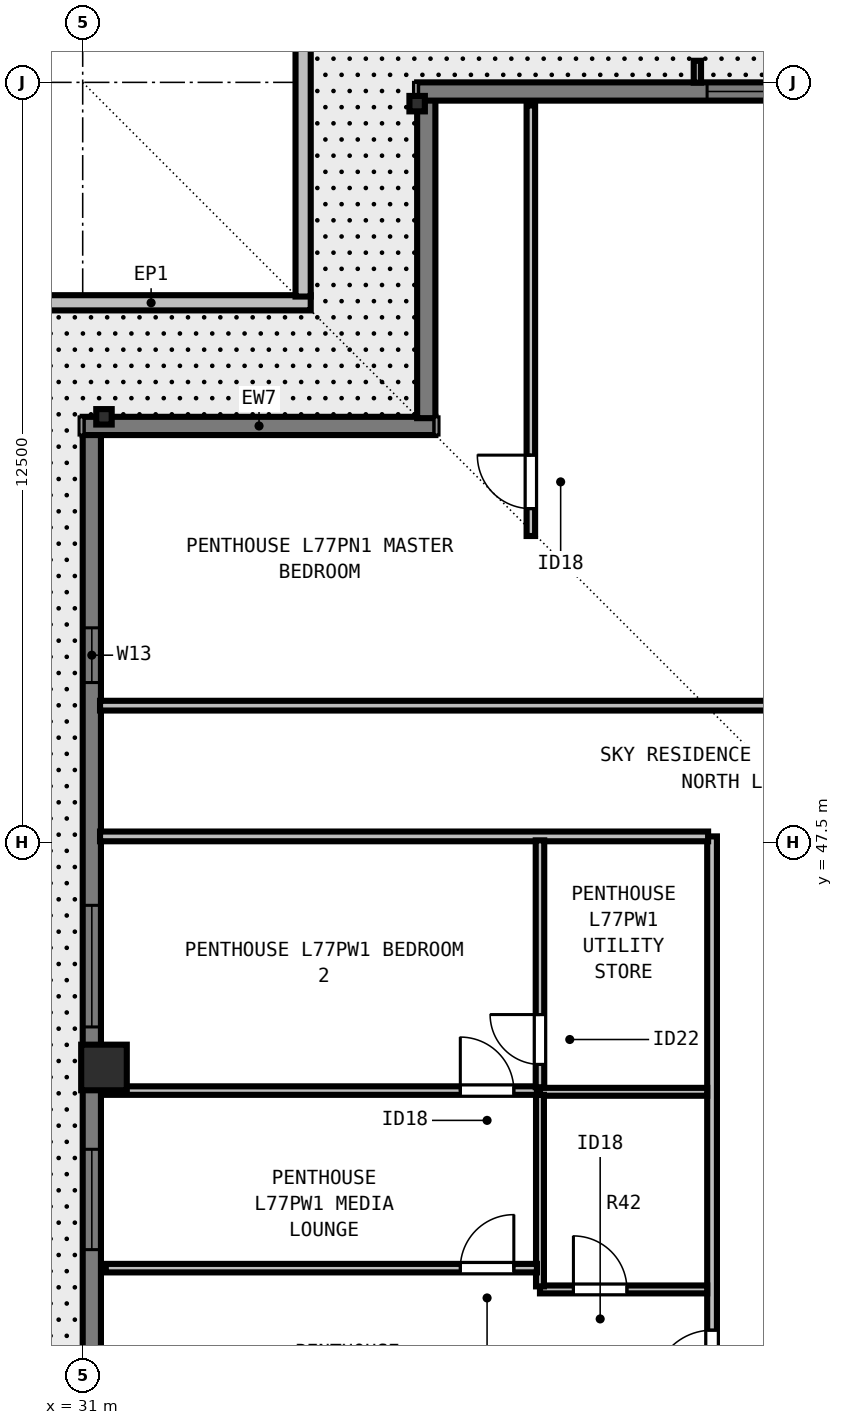
"""IFC4 building model, lengths in metres.
Left out: names, types, materials, properties, quantities, classifications, styles, units other than length and angle.
Written with IfcOpenShell. Run it as: python <this file> out.ifc"""

import sys

from ifc_helpers import new_model, si_unit, direction, frame, frame_2d, origin, origin_2d, place, context, subcontext, project, spatial, rectangle, i_section, extrude, element, fill, save


model = new_model("IFC4")
c1 = context("Model", 3, precision=1e-05, world=origin(), true_north=direction((0.0, 1.0)))
c2 = subcontext(c1, "Body", "Model", "MODEL_VIEW")
j1 = project(units=[si_unit("LENGTHUNIT", "METRE"), si_unit("PLANEANGLEUNIT", "RADIAN")], contexts=[c1])
p1 = place(None, origin())
s1 = spatial("IfcSite", under=j1, at=p1, CompositionType="ELEMENT")
p2 = place(p1, origin())
s2 = spatial("IfcBuilding", under=s1, at=p2, CompositionType="ELEMENT")
p3 = place(p2, frame((0.0, 0.0, 280.5)))
s3 = spatial("IfcBuildingStorey", under=s2, at=p3, CompositionType="ELEMENT", Elevation=280.5)
for number, where, z_axis, x_axis in (
    (1, (36.5, 59.65, 0.0), (0.0, 0.0, 1.0), (1.0, 0.0, 0.0)),
    (2, (31.35, 54.5, 0.0), (0.0, 0.0, 1.0), (0.0, 1.0, 0.0)),
):
    element("IfcColumn", number, at=place(p3, frame(where, z_axis=z_axis, x_axis=x_axis)), inside=s3, PredefinedType="COLUMN", context=c2, shape_type="SweptSolid", body=[
        extrude(i_section(OverallWidth=0.254, OverallDepth=0.254, WebThickness=0.009, FlangeThickness=0.014, FilletRadius=0.013, at=origin_2d()), origin(), (0.0, 0.0, 1.0), 3.5),
    ])
p4 = place(p3, frame((31.35, 43.8, 0.0), z_axis=(0.0, 0.0, 1.0), x_axis=(0.0, 1.0, 0.0)))
e3 = element("IfcColumn", 3, at=p4, inside=s3, PredefinedType="COLUMN", context=c2, shape_type="SweptSolid", body=[
    extrude(rectangle(XDim=0.75, YDim=0.75, at=origin_2d()), origin(), (0.0, 0.0, 1.0), 3.5),
])
p5 = place(p3, frame((29.5, 56.375, 0.0), z_axis=(0.0, 0.0, 1.0), x_axis=(1.0, 0.0, 0.0)))
e4 = element("IfcWall", 4, at=p5, inside=s3, PredefinedType="PARAPET", context=c2, shape_type="SweptSolid", body=[
    extrude(rectangle(XDim=5.25, YDim=0.25, at=frame_2d((2.625, 0.0))), origin(), (0.0, 0.0, 1.0), 1.15),
])
p6 = place(p3, frame((34.625, 56.478, 0.0), z_axis=(0.0, 0.0, 1.0), x_axis=(0.0, 1.0, 0.0)))
e5 = element("IfcWall", 5, at=p6, inside=s3, PredefinedType="PARAPET", context=c2, shape_type="SweptSolid", body=[
    extrude(rectangle(XDim=4.794, YDim=0.25, at=frame_2d((2.397, 0.0))), origin(), (0.0, 0.0, 1.0), 1.15),
])
p7 = place(p3, frame((31.15, 23.5, 0.0), z_axis=(0.0, 0.0, 1.0), x_axis=(0.0, 1.0, 0.0)))
e6 = element("IfcWall", 6, at=p7, inside=s3, PredefinedType="SOLIDWALL", context=c2, shape_type="SweptSolid", body=[
    extrude(rectangle(XDim=30.722, YDim=0.3, at=frame_2d((15.361, 0.0))), origin(), (0.0, 0.0, 1.0), 3.29),
])
p8 = place(p7, frame((8.331, 0.0, 0.8)))
e7 = element("IfcOpeningElement", 7, at=p8, cuts=e6, PredefinedType="OPENING", context=c2, shape_type="SweptSolid", body=[
    extrude(rectangle(XDim=1.65, YDim=1.758, at=frame_2d((0.825, 0.879))), frame((0.0, 0.16, 0.0), z_axis=(0.0, -1.0, 0.0), x_axis=(1.0, 0.0, 0.0)), (0.0, 0.0, 1.0), 0.32),
])
p9 = place(p7, frame((12.442, 0.0, 0.8)))
e8 = element("IfcOpeningElement", 8, at=p9, cuts=e6, PredefinedType="OPENING", context=c2, shape_type="SweptSolid", body=[
    extrude(rectangle(XDim=2.0, YDim=1.758, at=frame_2d((1.0, 0.879))), frame((0.0, 0.16, 0.0), z_axis=(0.0, -1.0, 0.0), x_axis=(1.0, 0.0, 0.0)), (0.0, 0.0, 1.0), 0.32),
])
p10 = place(p7, frame((17.304, 0.0, 0.8)))
e9 = element("IfcOpeningElement", 9, at=p10, cuts=e6, PredefinedType="OPENING", context=c2, shape_type="SweptSolid", body=[
    extrude(rectangle(XDim=1.65, YDim=1.758, at=frame_2d((0.825, 0.879))), frame((0.0, 0.16, 0.0), z_axis=(0.0, -1.0, 0.0), x_axis=(1.0, 0.0, 0.0)), (0.0, 0.0, 1.0), 0.32),
])
p11 = place(p7, frame((20.967, 0.0, 0.8)))
e10 = element("IfcOpeningElement", 10, at=p11, cuts=e6, PredefinedType="OPENING", context=c2, shape_type="SweptSolid", body=[
    extrude(rectangle(XDim=2.0, YDim=1.758, at=frame_2d((1.0, 0.879))), frame((0.0, 0.16, 0.0), z_axis=(0.0, -1.0, 0.0), x_axis=(1.0, 0.0, 0.0)), (0.0, 0.0, 1.0), 0.32),
])
p12 = place(p7, frame((26.63, 0.0, 0.8)))
e11 = element("IfcOpeningElement", 11, at=p12, cuts=e6, PredefinedType="OPENING", context=c2, shape_type="SweptSolid", body=[
    extrude(rectangle(XDim=0.9, YDim=1.75, at=frame_2d((0.45, 0.875))), frame((0.0, 0.16, 0.0), z_axis=(0.0, -1.0, 0.0), x_axis=(1.0, 0.0, 0.0)), (0.0, 0.0, 1.0), 0.32),
])
p13 = place(p3, frame((31.0, 54.35, 0.0), z_axis=(0.0, 0.0, 1.0), x_axis=(1.0, 0.0, 0.0)))
e12 = element("IfcWall", 12, at=p13, inside=s3, PredefinedType="SOLIDWALL", context=c2, shape_type="SweptSolid", body=[
    extrude(rectangle(XDim=5.8, YDim=0.3, at=frame_2d((2.9, 0.0))), origin(), (0.0, 0.0, 1.0), 3.29),
])
p14 = place(p3, frame((36.65, 54.478, 0.0), z_axis=(0.0, 0.0, 1.0), x_axis=(0.0, 1.0, 0.0)))
e13 = element("IfcWall", 13, at=p14, inside=s3, PredefinedType="SOLIDWALL", context=c2, shape_type="SweptSolid", body=[
    extrude(rectangle(XDim=5.244, YDim=0.3, at=frame_2d((2.622, 0.0))), origin(), (0.0, 0.0, 1.0), 3.29),
])
p15 = place(p3, frame((36.5, 59.85, 0.0), z_axis=(0.0, 0.0, 1.0), x_axis=(1.0, 0.0, 0.0)))
e14 = element("IfcWall", 14, at=p15, inside=s3, PredefinedType="SOLIDWALL", context=c2, shape_type="SweptSolid", body=[
    extrude(rectangle(XDim=30.722, YDim=0.3, at=frame_2d((15.361, 0.0))), origin(), (0.0, 0.0, 1.0), 3.29),
])
p16 = place(p15, frame((4.769, 0.0, 0.8)))
e15 = element("IfcOpeningElement", 15, at=p16, cuts=e14, PredefinedType="OPENING", context=c2, shape_type="SweptSolid", body=[
    extrude(rectangle(XDim=2.0, YDim=1.758, at=frame_2d((1.0, 0.879))), frame((0.0, 0.16, 0.0), z_axis=(0.0, -1.0, 0.0), x_axis=(1.0, 0.0, 0.0)), (0.0, 0.0, 1.0), 0.32),
])
p17 = place(p15, frame((8.331, 0.0, 0.8)))
e16 = element("IfcOpeningElement", 16, at=p17, cuts=e14, PredefinedType="OPENING", context=c2, shape_type="SweptSolid", body=[
    extrude(rectangle(XDim=1.65, YDim=1.758, at=frame_2d((0.825, 0.879))), frame((0.0, 0.16, 0.0), z_axis=(0.0, -1.0, 0.0), x_axis=(1.0, 0.0, 0.0)), (0.0, 0.0, 1.0), 0.32),
])
p18 = place(p15, frame((12.442, 0.0, 0.8)))
e17 = element("IfcOpeningElement", 17, at=p18, cuts=e14, PredefinedType="OPENING", context=c2, shape_type="SweptSolid", body=[
    extrude(rectangle(XDim=2.0, YDim=1.758, at=frame_2d((1.0, 0.879))), frame((0.0, 0.16, 0.0), z_axis=(0.0, -1.0, 0.0), x_axis=(1.0, 0.0, 0.0)), (0.0, 0.0, 1.0), 0.32),
])
p19 = place(p15, frame((17.304, 0.0, 0.8)))
e18 = element("IfcOpeningElement", 18, at=p19, cuts=e14, PredefinedType="OPENING", context=c2, shape_type="SweptSolid", body=[
    extrude(rectangle(XDim=1.65, YDim=1.758, at=frame_2d((0.825, 0.879))), frame((0.0, 0.16, 0.0), z_axis=(0.0, -1.0, 0.0), x_axis=(1.0, 0.0, 0.0)), (0.0, 0.0, 1.0), 0.32),
])
p20 = place(p15, frame((24.128, 0.0, 0.8)))
e19 = element("IfcOpeningElement", 19, at=p20, cuts=e14, PredefinedType="OPENING", context=c2, shape_type="SweptSolid", body=[
    extrude(rectangle(XDim=1.65, YDim=1.758, at=frame_2d((0.825, 0.879))), frame((0.0, 0.16, 0.0), z_axis=(0.0, -1.0, 0.0), x_axis=(1.0, 0.0, 0.0)), (0.0, 0.0, 1.0), 0.32),
])
p21 = place(p3, frame((31.285, 49.75, 0.0), z_axis=(0.0, 0.0, 1.0), x_axis=(1.0, 0.0, 0.0)))
e20 = element("IfcWall", 20, at=p21, inside=s3, PredefinedType="PARTITIONING", context=c2, shape_type="SweptSolid", body=[
    extrude(rectangle(XDim=41.43, YDim=0.16, at=frame_2d((20.715, 0.0))), origin(), (0.0, 0.0, 1.0), 3.009),
])
p22 = place(p21, frame((20.235, 0.0, 0.0)))
e21 = element("IfcOpeningElement", 21, at=p22, cuts=e20, PredefinedType="OPENING", context=c2, shape_type="SweptSolid", body=[
    extrude(rectangle(XDim=0.96, YDim=2.18, at=frame_2d((0.48, 1.09))), frame((0.0, 0.09, 0.0), z_axis=(0.0, -1.0, 0.0), x_axis=(1.0, 0.0, 0.0)), (0.0, 0.0, 1.0), 0.18),
])
p23 = place(p3, frame((41.35, 30.4, 0.0), z_axis=(0.0, 0.0, 1.0), x_axis=(0.0, 1.0, 0.0)))
e22 = element("IfcWall", 22, at=p23, inside=s3, PredefinedType="PARTITIONING", context=c2, shape_type="SweptSolid", body=[
    extrude(rectangle(XDim=17.2, YDim=0.16, at=frame_2d((8.6, 0.0))), origin(), (0.0, 0.0, 1.0), 3.009),
])
p24 = place(p23, frame((8.12, 0.0, 0.0)))
e23 = element("IfcOpeningElement", 23, at=p24, cuts=e22, PredefinedType="OPENING", context=c2, shape_type="SweptSolid", body=[
    extrude(rectangle(XDim=0.96, YDim=2.18, at=frame_2d((0.48, 1.09))), frame((0.0, 0.09, 0.0), z_axis=(0.0, -1.0, 0.0), x_axis=(1.0, 0.0, 0.0)), (0.0, 0.0, 1.0), 0.18),
])
p25 = place(p3, frame((31.285, 47.6, 0.0), z_axis=(0.0, 0.0, 1.0), x_axis=(1.0, 0.0, 0.0)))
e24 = element("IfcWall", 24, at=p25, inside=s3, PredefinedType="PARTITIONING", context=c2, shape_type="SweptSolid", body=[
    extrude(rectangle(XDim=10.0, YDim=0.16, at=frame_2d((5.0, 0.0))), origin(), (0.0, 0.0, 1.0), 3.29),
])
p26 = place(p3, frame((38.37, 52.54, 0.0), z_axis=(0.0, 0.0, 1.0), x_axis=(0.0, 1.0, 0.0)))
e25 = element("IfcWall", 25, at=p26, inside=s3, PredefinedType="PARTITIONING", context=c2, shape_type="SweptSolid", body=[
    extrude(rectangle(XDim=7.08, YDim=0.14, at=frame_2d((3.54, 0.0))), origin(), (0.0, 0.0, 1.0), 2.653),
])
p27 = place(p26, frame((0.45, 0.0, 0.0)))
e26 = element("IfcOpeningElement", 26, at=p27, cuts=e25, PredefinedType="OPENING", context=c2, shape_type="SweptSolid", body=[
    extrude(rectangle(XDim=0.88, YDim=2.1, at=frame_2d((0.44, 1.05))), frame((0.0, 0.08, 0.0), z_axis=(0.0, -1.0, 0.0), x_axis=(1.0, 0.0, 0.0)), (0.0, 0.0, 1.0), 0.16),
])
p28 = place(p3, frame((38.52, 43.4, 0.0), z_axis=(0.0, 0.0, 1.0), x_axis=(1.0, 0.0, 0.0)))
e27 = element("IfcWall", 27, at=p28, inside=s3, PredefinedType="PLUMBINGWALL", context=c2, shape_type="SweptSolid", body=[
    extrude(rectangle(XDim=2.75, YDim=0.13, at=frame_2d((1.375, 0.0))), origin(), (0.0, 0.0, 1.0), 3.29),
])
p29 = place(p3, frame((38.52, 40.15, 0.0), z_axis=(0.0, 0.0, 1.0), x_axis=(1.0, 0.0, 0.0)))
e28 = element("IfcWall", 28, at=p29, inside=s3, PredefinedType="PLUMBINGWALL", context=c2, shape_type="SweptSolid", body=[
    extrude(rectangle(XDim=2.75, YDim=0.13, at=frame_2d((1.375, 0.0))), origin(), (0.0, 0.0, 1.0), 3.29),
])
p30 = place(p29, frame((0.55, 0.0, 0.0)))
e29 = element("IfcOpeningElement", 29, at=p30, cuts=e28, PredefinedType="OPENING", context=c2, shape_type="SweptSolid", body=[
    extrude(rectangle(XDim=0.88, YDim=2.1, at=frame_2d((0.44, 1.05))), frame((0.0, 0.075, 0.0), z_axis=(0.0, -1.0, 0.0), x_axis=(1.0, 0.0, 0.0)), (0.0, 0.0, 1.0), 0.15),
])
p31 = place(p3, frame((38.52, 40.2, 0.0), z_axis=(0.0, 0.0, 1.0), x_axis=(0.0, 1.0, 0.0)))
e30 = element("IfcWall", 30, at=p31, inside=s3, PredefinedType="PLUMBINGWALL", context=c2, shape_type="SweptSolid", body=[
    extrude(rectangle(XDim=3.15, YDim=0.13, at=frame_2d((1.575, 0.0))), origin(), (0.0, 0.0, 1.0), 3.009),
])
p32 = place(p3, frame((31.38, 43.42, 0.0), z_axis=(0.0, 0.0, 1.0), x_axis=(1.0, 0.0, 0.0)))
e31 = element("IfcWall", 31, at=p32, inside=s3, PredefinedType="PARTITIONING", context=c2, shape_type="SweptSolid", body=[
    extrude(rectangle(XDim=7.09, YDim=0.14, at=frame_2d((3.545, 0.0))), origin(), (0.0, 0.0, 1.0), 3.29),
])
p33 = place(p32, frame((5.83, 0.0, 0.0)))
e32 = element("IfcOpeningElement", 32, at=p33, cuts=e31, PredefinedType="OPENING", context=c2, shape_type="SweptSolid", body=[
    extrude(rectangle(XDim=0.88, YDim=2.1, at=frame_2d((0.44, 1.05))), frame((0.0, 0.08, 0.0), z_axis=(0.0, -1.0, 0.0), x_axis=(1.0, 0.0, 0.0)), (0.0, 0.0, 1.0), 0.16),
])
p34 = place(p3, frame((38.52, 43.475, 0.0), z_axis=(0.0, 0.0, 1.0), x_axis=(0.0, 1.0, 0.0)))
e33 = element("IfcWall", 33, at=p34, inside=s3, PredefinedType="PARTITIONING", context=c2, shape_type="SweptSolid", body=[
    extrude(rectangle(XDim=4.06, YDim=0.14, at=frame_2d((2.03, 0.0))), origin(), (0.0, 0.0, 1.0), 3.29),
])
p35 = place(p34, frame((0.375, 0.0, 0.0)))
e34 = element("IfcOpeningElement", 34, at=p35, cuts=e33, PredefinedType="OPENING", context=c2, shape_type="SweptSolid", body=[
    extrude(rectangle(XDim=0.82, YDim=2.1, at=frame_2d((0.41, 1.05))), frame((0.0, 0.08, 0.0), z_axis=(0.0, -1.0, 0.0), x_axis=(1.0, 0.0, 0.0)), (0.0, 0.0, 1.0), 0.16),
])
p36 = place(p3, frame((31.38, 40.5, 0.0), z_axis=(0.0, 0.0, 1.0), x_axis=(1.0, 0.0, 0.0)))
e35 = element("IfcWall", 35, at=p36, inside=s3, PredefinedType="PARTITIONING", context=c2, shape_type="SweptSolid", body=[
    extrude(rectangle(XDim=7.09, YDim=0.14, at=frame_2d((3.545, 0.0))), origin(), (0.0, 0.0, 1.0), 3.29),
])
p37 = place(p36, frame((5.83, 0.0, 0.0)))
e36 = element("IfcOpeningElement", 36, at=p37, cuts=e35, PredefinedType="OPENING", context=c2, shape_type="SweptSolid", body=[
    extrude(rectangle(XDim=0.88, YDim=2.1, at=frame_2d((0.44, 1.05))), frame((0.0, 0.08, 0.0), z_axis=(0.0, -1.0, 0.0), x_axis=(1.0, 0.0, 0.0)), (0.0, 0.0, 1.0), 0.16),
])
p38 = place(p10, origin())
e37 = element("IfcWindow", 37, at=p38, inside=s3, PartitioningType="SINGLE_PANEL", PredefinedType="WINDOW", context=c2, shape_type="SweptSolid", body=[
    extrude(rectangle(XDim=1.65, YDim=1.758, at=frame_2d((0.825, 0.879))), frame((0.0, -0.05, 0.0), z_axis=(0.0, -1.0, 0.0), x_axis=(1.0, 0.0, 0.0)), (0.0, 0.0, 1.0), 0.06),
])
fill(e9, e37)
p39 = place(p11, origin())
e38 = element("IfcWindow", 38, at=p39, inside=s3, PartitioningType="SINGLE_PANEL", PredefinedType="WINDOW", context=c2, shape_type="SweptSolid", body=[
    extrude(rectangle(XDim=2.0, YDim=1.758, at=frame_2d((1.0, 0.879))), frame((0.0, -0.05, 0.0), z_axis=(0.0, -1.0, 0.0), x_axis=(1.0, 0.0, 0.0)), (0.0, 0.0, 1.0), 0.06),
])
fill(e10, e38)
p40 = place(p16, origin())
e39 = element("IfcWindow", 39, at=p40, inside=s3, PartitioningType="SINGLE_PANEL", PredefinedType="WINDOW", context=c2, shape_type="SweptSolid", body=[
    extrude(rectangle(XDim=2.0, YDim=1.758, at=frame_2d((1.0, 0.879))), frame((0.0, -0.05, 0.0), z_axis=(0.0, -1.0, 0.0), x_axis=(1.0, 0.0, 0.0)), (0.0, 0.0, 1.0), 0.06),
])
fill(e15, e39)
p41 = place(p12, origin())
e40 = element("IfcWindow", 40, at=p41, inside=s3, PartitioningType="SINGLE_PANEL", PredefinedType="WINDOW", context=c2, shape_type="SweptSolid", body=[
    extrude(rectangle(XDim=0.9, YDim=1.75, at=frame_2d((0.45, 0.875))), frame((0.0, -0.04, 0.0), z_axis=(0.0, -1.0, 0.0), x_axis=(1.0, 0.0, 0.0)), (0.0, 0.0, 1.0), 0.06),
])
fill(e11, e40)
p42 = place(p27, origin())
e41 = element("IfcDoor", 41, at=p42, inside=s3, OperationType="SINGLE_SWING_RIGHT", PredefinedType="DOOR", context=c2, shape_type="SweptSolid", body=[
    extrude(rectangle(XDim=0.88, YDim=2.1, at=frame_2d((0.44, 1.05))), frame((0.0, 0.025, 0.0), z_axis=(0.0, -1.0, 0.0), x_axis=(1.0, 0.0, 0.0)), (0.0, 0.0, 1.0), 0.05),
])
fill(e26, e41)
p43 = place(p30, origin())
e42 = element("IfcDoor", 42, at=p43, inside=s3, OperationType="SINGLE_SWING_LEFT", PredefinedType="DOOR", context=c2, shape_type="SweptSolid", body=[
    extrude(rectangle(XDim=0.88, YDim=2.1, at=frame_2d((0.44, 1.05))), frame((0.0, 0.025, 0.0), z_axis=(0.0, -1.0, 0.0), x_axis=(1.0, 0.0, 0.0)), (0.0, 0.0, 1.0), 0.05),
])
fill(e29, e42)
p44 = place(p35, origin())
e43 = element("IfcDoor", 43, at=p44, inside=s3, OperationType="SINGLE_SWING_RIGHT", PredefinedType="DOOR", context=c2, shape_type="SweptSolid", body=[
    extrude(rectangle(XDim=0.82, YDim=2.1, at=frame_2d((0.41, 1.05))), frame((0.0, 0.025, 0.0), z_axis=(0.0, -1.0, 0.0), x_axis=(1.0, 0.0, 0.0)), (0.0, 0.0, 1.0), 0.05),
])
fill(e34, e43)
p45 = place(p33, origin())
e44 = element("IfcDoor", 44, at=p45, inside=s3, OperationType="SINGLE_SWING_LEFT", PredefinedType="DOOR", context=c2, shape_type="SweptSolid", body=[
    extrude(rectangle(XDim=0.88, YDim=2.1, at=frame_2d((0.44, 1.05))), frame((0.0, 0.025, 0.0), z_axis=(0.0, -1.0, 0.0), x_axis=(1.0, 0.0, 0.0)), (0.0, 0.0, 1.0), 0.05),
])
fill(e32, e44)
p46 = place(p37, origin())
e45 = element("IfcDoor", 45, at=p46, inside=s3, OperationType="SINGLE_SWING_RIGHT", PredefinedType="DOOR", context=c2, shape_type="SweptSolid", body=[
    extrude(rectangle(XDim=0.88, YDim=2.1, at=frame_2d((0.44, 1.05))), frame((0.0, 0.025, 0.0), z_axis=(0.0, -1.0, 0.0), x_axis=(1.0, 0.0, 0.0)), (0.0, 0.0, 1.0), 0.05),
])
fill(e36, e45)
p47 = place(p24, origin())
e46 = element("IfcDoor", 46, at=p47, inside=s3, OperationType="SINGLE_SWING_LEFT", PredefinedType="DOOR", context=c2, shape_type="SweptSolid", body=[
    extrude(rectangle(XDim=0.96, YDim=2.18, at=frame_2d((0.48, 1.09))), frame((0.0, 0.025, 0.0), z_axis=(0.0, -1.0, 0.0), x_axis=(1.0, 0.0, 0.0)), (0.0, 0.0, 1.0), 0.05),
])
fill(e23, e46)
save(model, sys.argv[1])
